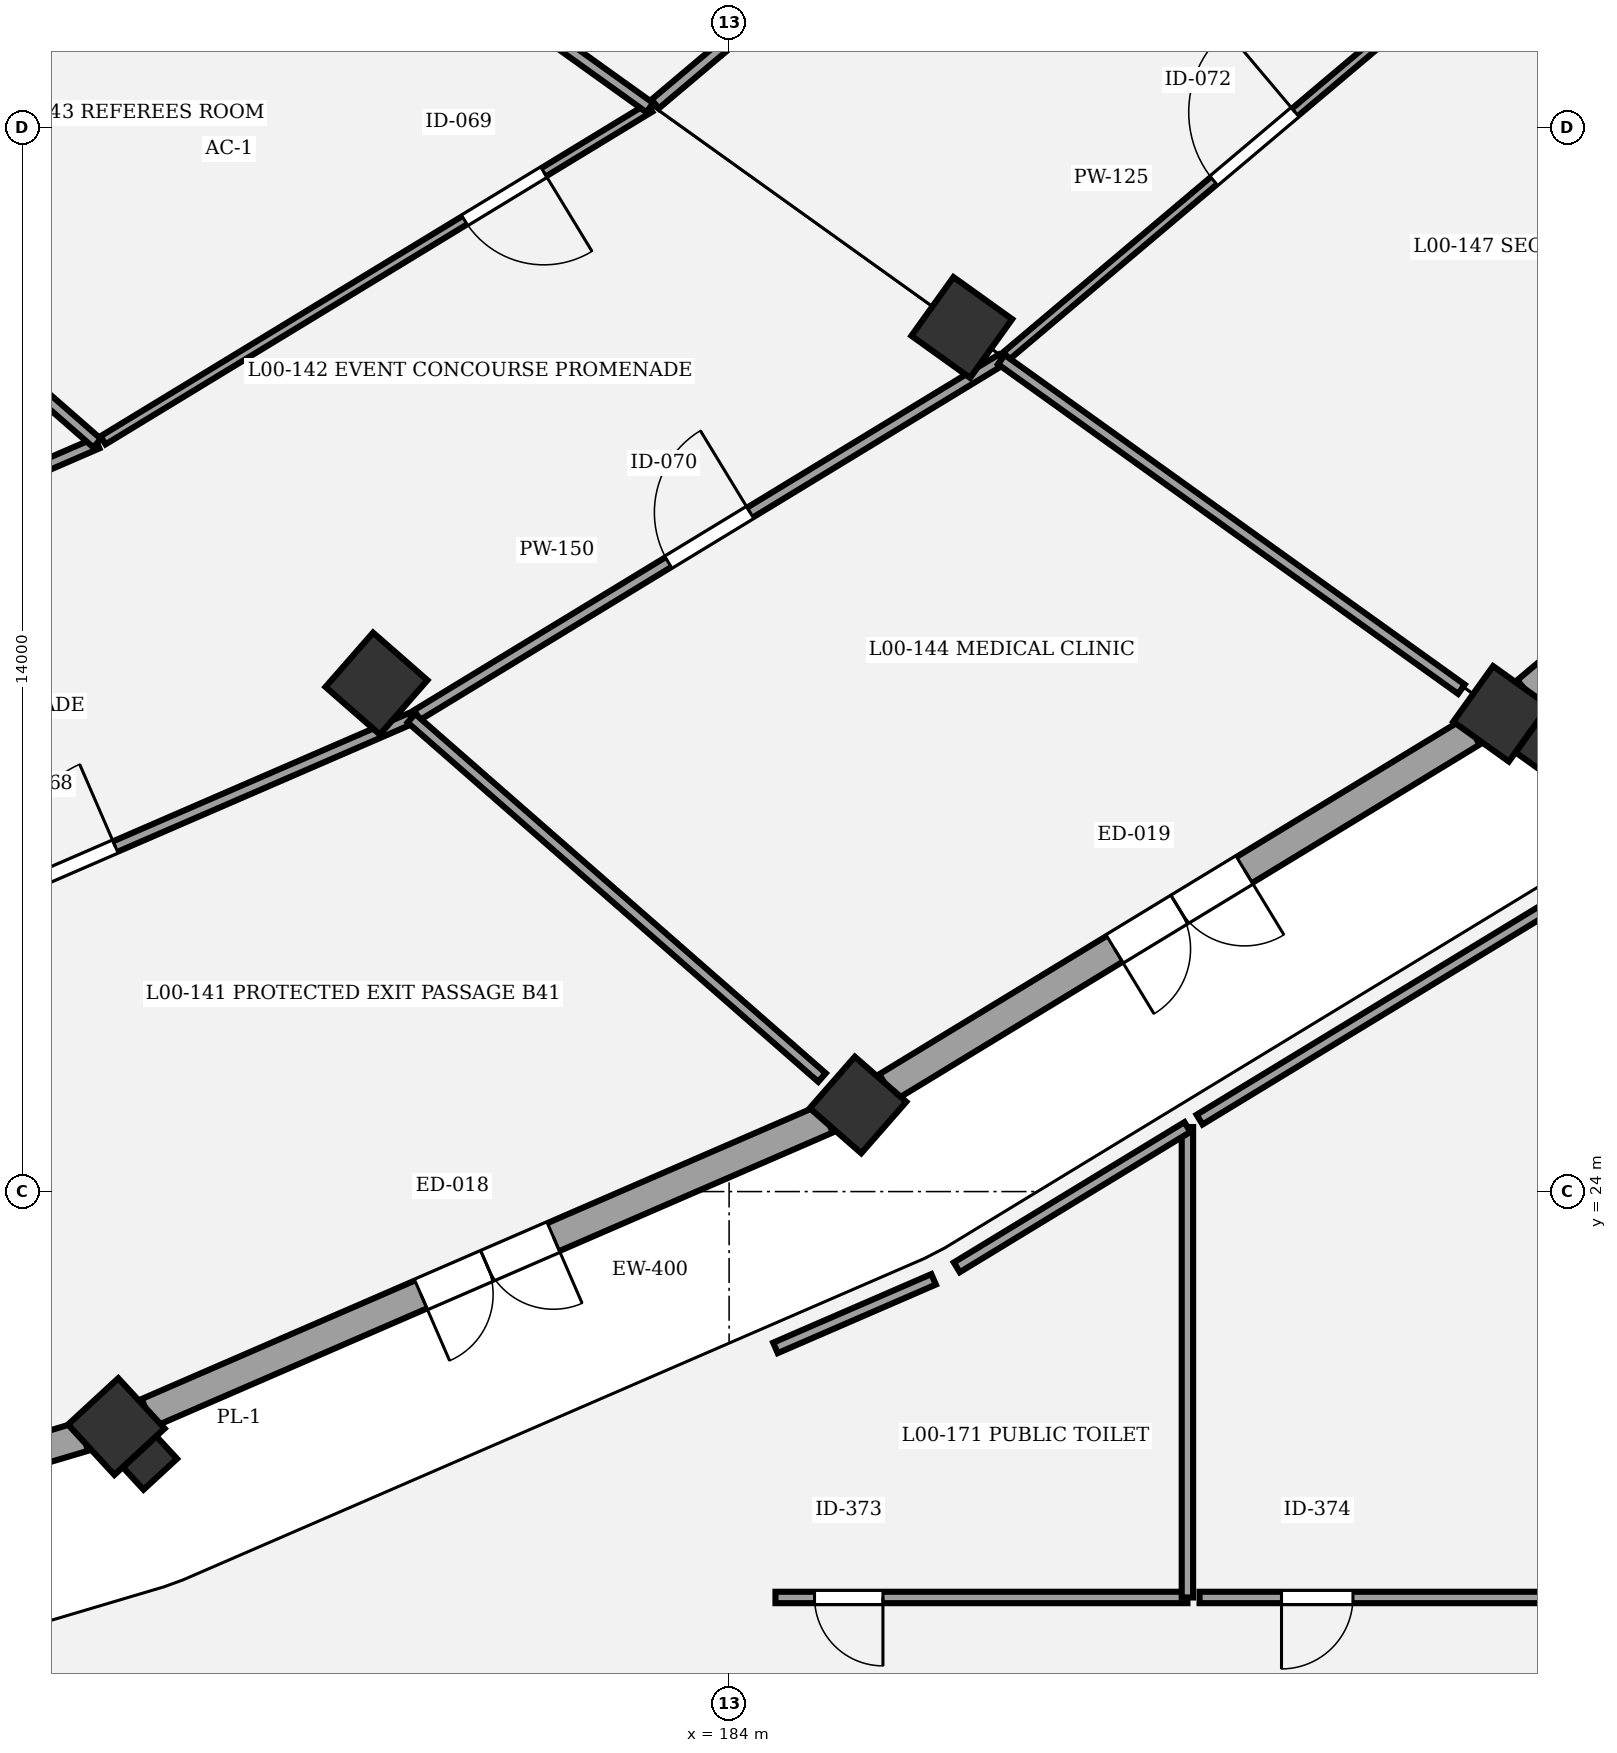
"""IFC4 building model, lengths in metres.
Left out: names, types, materials, properties, quantities, classifications, styles, units other than length and angle.
Written with IfcOpenShell. Run it as: python <this file> out.ifc"""

import sys

from ifc_helpers import new_model, si_unit, direction, frame, frame_2d, origin, origin_2d, place, context, subcontext, project, spatial, rectangle, extrude, element, fill, save


model = new_model("IFC4")
c1 = context("Model", 3, precision=1e-05, world=origin(), true_north=direction((0.0, 1.0)))
c2 = subcontext(c1, "Body", "Model", "MODEL_VIEW")
j1 = project(units=[si_unit("LENGTHUNIT", "METRE"), si_unit("PLANEANGLEUNIT", "RADIAN")], contexts=[c1])
p1 = place(None, origin())
s1 = spatial("IfcSite", under=j1, at=p1, CompositionType="ELEMENT")
p2 = place(p1, origin())
s2 = spatial("IfcBuilding", under=s1, at=p2, CompositionType="ELEMENT")
p3 = place(p2, origin())
s3 = spatial("IfcBuildingStorey", under=s2, at=p3, CompositionType="ELEMENT", Elevation=0.0)
p4 = place(p3, frame((175.938, 20.909, 0.0), z_axis=(0.0, 0.0, 1.0), x_axis=(0.677903094969, -0.735151272753, 0.0)))
e1 = element("IfcColumn", 1, at=p4, inside=s3, PredefinedType="COLUMN", context=c2, shape_type="SweptSolid", body=[
    extrude(rectangle(XDim=0.9, YDim=0.9, at=origin_2d()), origin(), (0.0, 0.0, 1.0), 5.4),
])
p5 = place(p3, frame((176.38, 20.429, 0.0), z_axis=(0.0, 0.0, 1.0), x_axis=(0.735151272753, 0.677903094969, 0.0)))
e2 = element("IfcColumn", 2, at=p5, inside=s3, PredefinedType="PILASTER", context=c2, shape_type="SweptSolid", body=[
    extrude(rectangle(XDim=0.6, YDim=0.4, at=origin_2d()), origin(), (0.0, 0.0, 1.0), 5.4),
])
p6 = place(p3, frame((179.36, 30.683, 0.0), z_axis=(0.0, 0.0, 1.0), x_axis=(0.752529860433, -0.658558128912, 0.0)))
e3 = element("IfcColumn", 3, at=p6, inside=s3, PredefinedType="COLUMN", context=c2, shape_type="SweptSolid", body=[
    extrude(rectangle(XDim=0.95, YDim=0.95, at=origin_2d()), origin(), (0.0, 0.0, 1.0), 5.4),
])
p7 = place(p3, frame((185.696, 25.139, 0.0), z_axis=(0.0, 0.0, 1.0), x_axis=(0.752529860433, -0.658558128912, 0.0)))
e4 = element("IfcColumn", 4, at=p7, inside=s3, PredefinedType="COLUMN", context=c2, shape_type="SweptSolid", body=[
    extrude(rectangle(XDim=0.9, YDim=0.9, at=origin_2d()), origin(), (0.0, 0.0, 1.0), 5.4),
])
p8 = place(p3, frame((187.061, 35.368, 0.0), z_axis=(0.0, 0.0, 1.0), x_axis=(0.812897512265, -0.582406760395, 0.0)))
e5 = element("IfcColumn", 5, at=p8, inside=s3, PredefinedType="COLUMN", context=c2, shape_type="SweptSolid", body=[
    extrude(rectangle(XDim=0.95, YDim=0.95, at=origin_2d()), origin(), (0.0, 0.0, 1.0), 5.4),
])
p9 = place(p3, frame((194.156, 30.285, 0.0), z_axis=(0.0, 0.0, 1.0), x_axis=(0.812897512265, -0.582406760395, 0.0)))
e6 = element("IfcColumn", 6, at=p9, inside=s3, PredefinedType="COLUMN", context=c2, shape_type="SweptSolid", body=[
    extrude(rectangle(XDim=0.9, YDim=0.9, at=origin_2d()), origin(), (0.0, 0.0, 1.0), 5.4),
])
p10 = place(p3, frame((194.686, 29.905, 0.0), z_axis=(0.0, 0.0, 1.0), x_axis=(0.582406760395, 0.812897512265, 0.0)))
e7 = element("IfcColumn", 7, at=p10, inside=s3, PredefinedType="PILASTER", context=c2, shape_type="SweptSolid", body=[
    extrude(rectangle(XDim=0.6, YDim=0.4, at=origin_2d()), origin(), (0.0, 0.0, 1.0), 5.4),
])
p11 = place(p3, frame((175.508, 20.781, 0.0), z_axis=(0.0, 0.0, 1.0), x_axis=(-0.958660844814, -0.284551198593, 0.0)))
e8 = element("IfcWall", 8, at=p11, inside=s3, PredefinedType="STANDARD", context=c2, shape_type="SweptSolid", body=[
    extrude(rectangle(XDim=10.72, YDim=0.4, at=frame_2d((5.36, 0.0))), origin(), (0.0, 0.0, 1.0), 4.25),
])
p12 = place(p11, frame((4.25, 0.0, 1.1)))
e9 = element("IfcOpeningElement", 9, at=p12, cuts=e8, PredefinedType="OPENING", context=c2, shape_type="SweptSolid", body=[
    extrude(rectangle(XDim=2.22, YDim=1.55, at=frame_2d((1.11, 0.775))), frame((0.0, 0.21, 0.0), z_axis=(0.0, -1.0, 0.0), x_axis=(1.0, 0.0, 0.0)), (0.0, 0.0, 1.0), 0.42),
])
p13 = place(p3, frame((185.285, 24.961, 0.0), z_axis=(0.0, 0.0, 1.0), x_axis=(-0.917498309763, -0.397739678159, 0.0)))
e10 = element("IfcWall", 10, at=p13, inside=s3, PredefinedType="STANDARD", context=c2, shape_type="SweptSolid", body=[
    extrude(rectangle(XDim=9.74, YDim=0.4, at=frame_2d((4.87, 0.0))), origin(), (0.0, 0.0, 1.0), 4.25),
])
p14 = place(p13, frame((3.92, 0.0, 0.0)))
e11 = element("IfcOpeningElement", 11, at=p14, cuts=e10, PredefinedType="OPENING", context=c2, shape_type="SweptSolid", body=[
    extrude(rectangle(XDim=1.9, YDim=2.4, at=frame_2d((0.95, 1.2))), frame((0.0, 0.21, 0.0), z_axis=(0.0, -1.0, 0.0), x_axis=(1.0, 0.0, 0.0)), (0.0, 0.0, 1.0), 0.42),
])
p15 = place(p3, frame((193.773, 30.053, 0.0), z_axis=(0.0, 0.0, 1.0), x_axis=(-0.854319454423, -0.519748275413, 0.0)))
e12 = element("IfcWall", 12, at=p15, inside=s3, PredefinedType="STANDARD", context=c2, shape_type="SweptSolid", body=[
    extrude(rectangle(XDim=9.006, YDim=0.4, at=frame_2d((4.503, 0.0))), origin(), (0.0, 0.0, 1.0), 4.25),
])
p16 = place(p15, frame((3.503, 0.0, 0.0)))
e13 = element("IfcOpeningElement", 13, at=p16, cuts=e12, PredefinedType="OPENING", context=c2, shape_type="SweptSolid", body=[
    extrude(rectangle(XDim=2.0, YDim=2.4, at=frame_2d((1.0, 1.2))), frame((0.0, 0.21, 0.0), z_axis=(0.0, -1.0, 0.0), x_axis=(1.0, 0.0, 0.0)), (0.0, 0.0, 1.0), 0.42),
])
p17 = place(p3, frame((200.996, 36.058, 0.0), z_axis=(0.0, 0.0, 1.0), x_axis=(-0.764254773348, -0.644914445035, 0.0)))
e14 = element("IfcWall", 14, at=p17, inside=s3, PredefinedType="STANDARD", context=c2, shape_type="SweptSolid", body=[
    extrude(rectangle(XDim=8.502, YDim=0.4, at=frame_2d((4.251, 0.0))), origin(), (0.0, 0.0, 1.0), 4.25),
])
p18 = place(p17, frame((3.201, 0.0, 0.0)))
e15 = element("IfcOpeningElement", 15, at=p18, cuts=e14, PredefinedType="OPENING", context=c2, shape_type="SweptSolid", body=[
    extrude(rectangle(XDim=2.1, YDim=2.45, at=frame_2d((1.05, 1.225))), frame((0.0, 0.21, 0.0), z_axis=(0.0, -1.0, 0.0), x_axis=(1.0, 0.0, 0.0)), (0.0, 0.0, 1.0), 0.42),
])
p19 = place(p3, frame((175.685, 33.846, 0.0), z_axis=(0.0, 0.0, 1.0), x_axis=(-0.917494590455, -0.397748257677, 0.0)))
e16 = element("IfcWall", 16, at=p19, inside=s3, PredefinedType="PARTITIONING", context=c2, shape_type="SweptSolid", body=[
    extrude(rectangle(XDim=9.049, YDim=0.15, at=frame_2d((4.525, 0.0))), origin(), (0.0, 0.0, 1.0), 4.15),
])
p20 = place(p19, frame((1.774, 0.0, 0.0)))
e17 = element("IfcOpeningElement", 17, at=p20, cuts=e16, PredefinedType="OPENING", context=c2, shape_type="SweptSolid", body=[
    extrude(rectangle(XDim=1.14, YDim=2.3, at=frame_2d((0.57, 1.15))), frame((0.0, 0.085, 0.0), z_axis=(0.0, -1.0, 0.0), x_axis=(1.0, 0.0, 0.0)), (0.0, 0.0, 1.0), 0.17),
])
p21 = place(p3, frame((170.946, 26.381, 0.0), z_axis=(0.0, 0.0, 1.0), x_axis=(0.917508957037, 0.39771511633, 0.0)))
e18 = element("IfcWall", 18, at=p21, inside=s3, PredefinedType="PARTITIONING", context=c2, shape_type="SweptSolid", body=[
    extrude(rectangle(XDim=9.671, YDim=0.15, at=frame_2d((4.836, 0.0))), origin(), (0.0, 0.0, 1.0), 4.15),
])
p22 = place(p21, frame((4.246, 0.0, 0.0)))
e19 = element("IfcOpeningElement", 19, at=p22, cuts=e18, PredefinedType="OPENING", context=c2, shape_type="SweptSolid", body=[
    extrude(rectangle(XDim=1.18, YDim=2.3, at=frame_2d((0.59, 1.15))), frame((0.0, 0.085, 0.0), z_axis=(0.0, -1.0, 0.0), x_axis=(1.0, 0.0, 0.0)), (0.0, 0.0, 1.0), 0.17),
])
p23 = place(p3, frame((182.957, 38.26, 0.0), z_axis=(0.0, 0.0, 1.0), x_axis=(-0.854330104408, -0.519730769439, 0.0)))
e20 = element("IfcWall", 20, at=p23, inside=s3, PredefinedType="PARTITIONING", context=c2, shape_type="SweptSolid", body=[
    extrude(rectangle(XDim=8.42, YDim=0.125, at=frame_2d((4.21, 0.0))), origin(), (0.0, 0.0, 1.0), 4.15),
])
p24 = place(p23, frame((1.632, 0.0, 0.0)))
e21 = element("IfcOpeningElement", 21, at=p24, cuts=e20, PredefinedType="OPENING", context=c2, shape_type="SweptSolid", body=[
    extrude(rectangle(XDim=1.22, YDim=2.3, at=frame_2d((0.61, 1.15))), frame((0.0, 0.073, 0.0), z_axis=(0.0, -1.0, 0.0), x_axis=(1.0, 0.0, 0.0)), (0.0, 0.0, 1.0), 0.145),
])
p25 = place(p3, frame((179.895, 30.269, 0.0), z_axis=(0.0, 0.0, 1.0), x_axis=(0.854321649351, 0.519744667554, 0.0)))
e22 = element("IfcWall", 22, at=p25, inside=s3, PredefinedType="PARTITIONING", context=c2, shape_type="SweptSolid", body=[
    extrude(rectangle(XDim=8.999, YDim=0.15, at=frame_2d((4.499, 0.0))), origin(), (0.0, 0.0, 1.0), 4.15),
])
p26 = place(p25, frame((3.869, 0.0, 0.0)))
e23 = element("IfcOpeningElement", 23, at=p26, cuts=e22, PredefinedType="OPENING", context=c2, shape_type="SweptSolid", body=[
    extrude(rectangle(XDim=1.26, YDim=2.3, at=frame_2d((0.63, 1.15))), frame((0.0, 0.085, 0.0), z_axis=(0.0, -1.0, 0.0), x_axis=(1.0, 0.0, 0.0)), (0.0, 0.0, 1.0), 0.17),
])
p27 = place(p3, frame((189.133, 43.461, 0.0), z_axis=(0.0, 0.0, 1.0), x_axis=(-0.764249122867, -0.644921141068, 0.0)))
e24 = element("IfcWall", 24, at=p27, inside=s3, PredefinedType="PARTITIONING", context=c2, shape_type="SweptSolid", body=[
    extrude(rectangle(XDim=7.99, YDim=0.15, at=frame_2d((3.995, 0.0))), origin(), (0.0, 0.0, 1.0), 4.15),
])
p28 = place(p27, frame((1.526, 0.0, 0.0)))
e25 = element("IfcOpeningElement", 25, at=p28, cuts=e24, PredefinedType="OPENING", context=c2, shape_type="SweptSolid", body=[
    extrude(rectangle(XDim=1.32, YDim=2.3, at=frame_2d((0.66, 1.15))), frame((0.0, 0.085, 0.0), z_axis=(0.0, -1.0, 0.0), x_axis=(1.0, 0.0, 0.0)), (0.0, 0.0, 1.0), 0.17),
])
p29 = place(p3, frame((187.649, 34.996, 0.0), z_axis=(0.0, 0.0, 1.0), x_axis=(0.764257572309, 0.644911128117, 0.0)))
e26 = element("IfcWall", 26, at=p29, inside=s3, PredefinedType="PARTITIONING", context=c2, shape_type="SweptSolid", body=[
    extrude(rectangle(XDim=8.539, YDim=0.125, at=frame_2d((4.269, 0.0))), origin(), (0.0, 0.0, 1.0), 4.15),
])
p30 = place(p29, frame((3.569, 0.0, 0.0)))
e27 = element("IfcOpeningElement", 27, at=p30, cuts=e26, PredefinedType="OPENING", context=c2, shape_type="SweptSolid", body=[
    extrude(rectangle(XDim=1.4, YDim=2.3, at=frame_2d((0.7, 1.15))), frame((0.0, 0.073, 0.0), z_axis=(0.0, -1.0, 0.0), x_axis=(1.0, 0.0, 0.0)), (0.0, 0.0, 1.0), 0.145),
])
p31 = place(p3, frame((190.03, 18.66, 0.0), z_axis=(0.0, 0.0, 1.0), x_axis=(-1.0, 0.0, 0.0)))
e28 = element("IfcWall", 28, at=p31, inside=s3, PredefinedType="PARTITIONING", context=c2, shape_type="SweptSolid", body=[
    extrude(rectangle(XDim=5.42, YDim=0.15, at=frame_2d((2.71, 0.0))), origin(), (0.0, 0.0, 1.0), 4.15),
])
p32 = place(p31, frame((4.006, 0.0, 0.0)))
e29 = element("IfcOpeningElement", 29, at=p32, cuts=e28, PredefinedType="OPENING", context=c2, shape_type="SweptSolid", body=[
    extrude(rectangle(XDim=0.9, YDim=2.2, at=frame_2d((0.45, 1.1))), frame((0.0, 0.085, 0.0), z_axis=(0.0, -1.0, 0.0), x_axis=(1.0, 0.0, 0.0)), (0.0, 0.0, 1.0), 0.17),
])
p33 = place(p3, frame((206.93, 18.66, 0.0), z_axis=(0.0, 0.0, 1.0), x_axis=(-1.0, 0.0, 0.0)))
e30 = element("IfcWall", 30, at=p33, inside=s3, PredefinedType="PARTITIONING", context=c2, shape_type="SweptSolid", body=[
    extrude(rectangle(XDim=16.74, YDim=0.15, at=frame_2d((8.37, 0.0))), origin(), (0.0, 0.0, 1.0), 4.15),
])
p34 = place(p33, frame((14.722, 0.0, 0.0)))
e31 = element("IfcOpeningElement", 31, at=p34, cuts=e30, PredefinedType="OPENING", context=c2, shape_type="SweptSolid", body=[
    extrude(rectangle(XDim=0.94, YDim=2.2, at=frame_2d((0.47, 1.1))), frame((0.0, 0.085, 0.0), z_axis=(0.0, -1.0, 0.0), x_axis=(1.0, 0.0, 0.0)), (0.0, 0.0, 1.0), 0.17),
])
p35 = place(p3, frame((164.68, 43.476, 0.0), z_axis=(0.0, 0.0, 1.0), x_axis=(0.752565317778, -0.658517609846, 0.0)))
e32 = element("IfcWall", 32, at=p35, inside=s3, PredefinedType="PARTITIONING", context=c2, shape_type="SweptSolid", body=[
    extrude(rectangle(XDim=14.623, YDim=0.15, at=frame_2d((7.312, 0.0))), origin(), (0.0, 0.0, 1.0), 4.15),
])
p36 = place(p3, frame((179.82, 30.228, 0.0), z_axis=(0.0, 0.0, 1.0), x_axis=(0.752576694707, -0.658504607869, 0.0)))
e33 = element("IfcWall", 33, at=p36, inside=s3, PredefinedType="PARTITIONING", context=c2, shape_type="SweptSolid", body=[
    extrude(rectangle(XDim=7.178, YDim=0.15, at=frame_2d((3.589, 0.0))), origin(), (0.0, 0.0, 1.0), 4.15),
])
p37 = place(p3, frame((170.631, 47.091, 0.0), z_axis=(0.0, 0.0, 1.0), x_axis=(0.812885100642, -0.582424083597, 0.0)))
e34 = element("IfcWall", 34, at=p37, inside=s3, PredefinedType="PARTITIONING", context=c2, shape_type="SweptSolid", body=[
    extrude(rectangle(XDim=15.163, YDim=0.15, at=frame_2d((7.581, 0.0))), origin(), (0.0, 0.0, 1.0), 4.15),
])
p38 = place(p3, frame((187.582, 34.946, 0.0), z_axis=(0.0, 0.0, 1.0), x_axis=(0.812888534941, -0.582419290342, 0.0)))
e35 = element("IfcWall", 35, at=p38, inside=s3, PredefinedType="PARTITIONING", context=c2, shape_type="SweptSolid", body=[
    extrude(rectangle(XDim=7.446, YDim=0.15, at=frame_2d((3.723, 0.0))), origin(), (0.0, 0.0, 1.0), 4.15),
])
p39 = place(p3, frame((194.175, 40.503, 0.0), z_axis=(0.0, 0.0, 1.0), x_axis=(0.862503200943, -0.506051606422, 0.0)))
e36 = element("IfcWall", 36, at=p39, inside=s3, PredefinedType="PARTITIONING", context=c2, shape_type="SweptSolid", body=[
    extrude(rectangle(XDim=7.659, YDim=0.15, at=frame_2d((3.829, 0.0))), origin(), (0.0, 0.0, 1.0), 4.15),
])
p40 = place(p3, frame((190.03, 24.849, 0.0), z_axis=(0.0, 0.0, 1.0), x_axis=(0.0, -1.0, 0.0)))
e37 = element("IfcWall", 37, at=p40, inside=s3, PredefinedType="PARTITIONING", context=c2, shape_type="SweptSolid", body=[
    extrude(rectangle(XDim=6.189, YDim=0.15, at=frame_2d((3.095, 0.0))), origin(), (0.0, 0.0, 1.0), 4.15),
])
p41 = place(p3, frame((184.61, 21.943, 0.0), z_axis=(0.0, 0.0, 1.0), x_axis=(0.917454774934, 0.397840088415, 0.0)))
e38 = element("IfcWall", 38, at=p41, inside=s3, PredefinedType="PARTITIONING", context=c2, shape_type="SweptSolid", body=[
    extrude(rectangle(XDim=2.268, YDim=0.15, at=frame_2d((1.134, 0.0))), origin(), (0.0, 0.0, 1.0), 4.15),
])
p42 = place(p3, frame((186.996, 23.003, 0.0), z_axis=(0.0, 0.0, 1.0), x_axis=(0.854335242099, 0.519722324042, 0.0)))
e39 = element("IfcWall", 39, at=p42, inside=s3, PredefinedType="PARTITIONING", context=c2, shape_type="SweptSolid", body=[
    extrude(rectangle(XDim=3.552, YDim=0.15, at=frame_2d((1.776, 0.0))), origin(), (0.0, 0.0, 1.0), 4.15),
])
p43 = place(p3, frame((190.19, 24.947, 0.0), z_axis=(0.0, 0.0, 1.0), x_axis=(0.854341575167, 0.519711913411, 0.0)))
e40 = element("IfcWall", 40, at=p43, inside=s3, PredefinedType="PARTITIONING", context=c2, shape_type="SweptSolid", body=[
    extrude(rectangle(XDim=6.163, YDim=0.15, at=frame_2d((3.082, 0.0))), origin(), (0.0, 0.0, 1.0), 4.15),
])
p44 = place(p14, origin())
e41 = element("IfcDoor", 41, at=p44, inside=s3, OperationType="DOUBLE_DOOR_SINGLE_SWING", PredefinedType="DOOR", context=c2, shape_type="SweptSolid", body=[
    extrude(rectangle(XDim=1.9, YDim=2.4, at=frame_2d((0.95, 1.2))), frame((0.0, 0.025, 0.0), z_axis=(0.0, -1.0, 0.0), x_axis=(1.0, 0.0, 0.0)), (0.0, 0.0, 1.0), 0.05),
])
fill(e11, e41)
p45 = place(p16, origin())
e42 = element("IfcDoor", 42, at=p45, inside=s3, OperationType="DOUBLE_DOOR_SINGLE_SWING", PredefinedType="DOOR", context=c2, shape_type="SweptSolid", body=[
    extrude(rectangle(XDim=2.0, YDim=2.4, at=frame_2d((1.0, 1.2))), frame((0.0, 0.025, 0.0), z_axis=(0.0, -1.0, 0.0), x_axis=(1.0, 0.0, 0.0)), (0.0, 0.0, 1.0), 0.05),
])
fill(e13, e42)
p46 = place(p22, origin())
e43 = element("IfcDoor", 43, at=p46, inside=s3, OperationType="SINGLE_SWING_RIGHT", PredefinedType="DOOR", context=c2, shape_type="SweptSolid", body=[
    extrude(rectangle(XDim=1.18, YDim=2.3, at=frame_2d((0.59, 1.15))), frame((0.0, 0.025, 0.0), z_axis=(0.0, -1.0, 0.0), x_axis=(1.0, 0.0, 0.0)), (0.0, 0.0, 1.0), 0.05),
])
fill(e19, e43)
p47 = place(p24, origin())
e44 = element("IfcDoor", 44, at=p47, inside=s3, OperationType="SINGLE_SWING_LEFT", PredefinedType="DOOR", context=c2, shape_type="SweptSolid", body=[
    extrude(rectangle(XDim=1.22, YDim=2.3, at=frame_2d((0.61, 1.15))), frame((0.0, 0.025, 0.0), z_axis=(0.0, -1.0, 0.0), x_axis=(1.0, 0.0, 0.0)), (0.0, 0.0, 1.0), 0.05),
])
fill(e21, e44)
p48 = place(p26, origin())
e45 = element("IfcDoor", 45, at=p48, inside=s3, OperationType="SINGLE_SWING_RIGHT", PredefinedType="DOOR", context=c2, shape_type="SweptSolid", body=[
    extrude(rectangle(XDim=1.26, YDim=2.3, at=frame_2d((0.63, 1.15))), frame((0.0, 0.025, 0.0), z_axis=(0.0, -1.0, 0.0), x_axis=(1.0, 0.0, 0.0)), (0.0, 0.0, 1.0), 0.05),
])
fill(e23, e45)
p49 = place(p30, origin())
e46 = element("IfcDoor", 46, at=p49, inside=s3, OperationType="SINGLE_SWING_RIGHT", PredefinedType="DOOR", context=c2, shape_type="SweptSolid", body=[
    extrude(rectangle(XDim=1.4, YDim=2.3, at=frame_2d((0.7, 1.15))), frame((0.0, 0.025, 0.0), z_axis=(0.0, -1.0, 0.0), x_axis=(1.0, 0.0, 0.0)), (0.0, 0.0, 1.0), 0.05),
])
fill(e27, e46)
p50 = place(p32, origin())
e47 = element("IfcDoor", 47, at=p50, inside=s3, OperationType="SINGLE_SWING_LEFT", PredefinedType="DOOR", context=c2, shape_type="SweptSolid", body=[
    extrude(rectangle(XDim=0.9, YDim=2.2, at=frame_2d((0.45, 1.1))), frame((0.0, 0.025, 0.0), z_axis=(0.0, -1.0, 0.0), x_axis=(1.0, 0.0, 0.0)), (0.0, 0.0, 1.0), 0.05),
])
fill(e29, e47)
p51 = place(p34, origin())
e48 = element("IfcDoor", 48, at=p51, inside=s3, OperationType="SINGLE_SWING_RIGHT", PredefinedType="DOOR", context=c2, shape_type="SweptSolid", body=[
    extrude(rectangle(XDim=0.94, YDim=2.2, at=frame_2d((0.47, 1.1))), frame((0.0, 0.025, 0.0), z_axis=(0.0, -1.0, 0.0), x_axis=(1.0, 0.0, 0.0)), (0.0, 0.0, 1.0), 0.05),
])
fill(e31, e48)
save(model, sys.argv[1])
